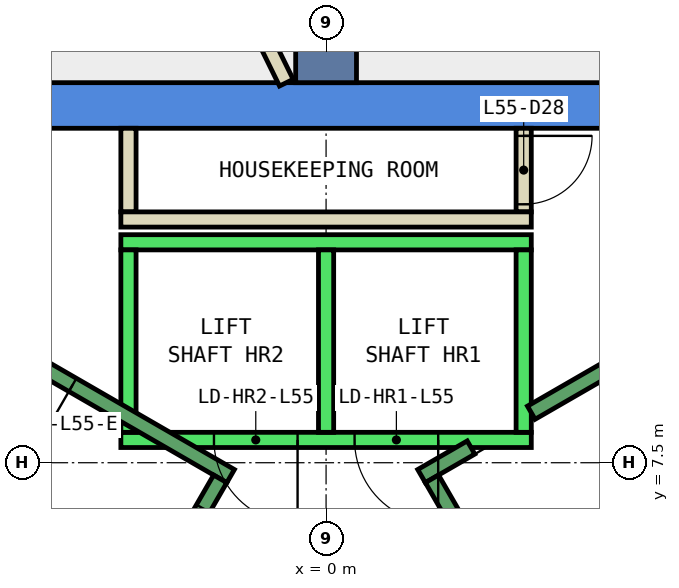
"""IFC4 building model, lengths in metres.
Left out: names, types, materials, properties, quantities, classifications, styles, units other than length and angle.
Written with IfcOpenShell. Run it as: python <this file> out.ifc"""

import sys

from ifc_helpers import new_model, si_unit, direction, frame, frame_2d, origin, place, context, subcontext, project, spatial, polyline, rectangle, outline, extrude, element, fill, save


model = new_model("IFC4")
c1 = context("Model", 3, precision=1e-05, world=origin(), true_north=direction((0.0, 1.0)))
c2 = subcontext(c1, "Body", "Model", "MODEL_VIEW")
j1 = project(units=[si_unit("LENGTHUNIT", "METRE"), si_unit("PLANEANGLEUNIT", "RADIAN")], contexts=[c1])
p1 = place(None, origin())
s1 = spatial("IfcSite", under=j1, at=p1, CompositionType="ELEMENT")
p2 = place(p1, origin())
s2 = spatial("IfcBuilding", under=s1, at=p2, CompositionType="ELEMENT")
p3 = place(p2, frame((0.0, 0.0, 245.0)))
s3 = spatial("IfcBuildingStorey", under=s2, at=p3, CompositionType="ELEMENT", Elevation=245.0)
p4 = place(p3, frame((0.0, 0.0, -0.34)))
e1 = element("IfcWall", 1, at=p4, inside=s3, PredefinedType="SHEAR", context=c2, shape_type="SweptSolid", body=[
    extrude(outline(polyline([(5.774, 12.5), (-5.774, 12.5), (-5.427, 11.9), (5.427, 11.9), (5.774, 12.5)])), origin(), (0.0, 0.0, 1.0), 3.6),
])
p5 = place(p3, frame((0.0, 12.5, -0.34), z_axis=(0.0, 0.0, 1.0), x_axis=(0.0, 1.0, 0.0)))
e2 = element("IfcWall", 2, at=p5, inside=s3, PredefinedType="SHEAR", context=c2, shape_type="SweptSolid", body=[
    extrude(rectangle(XDim=9.0, YDim=0.8, at=frame_2d((4.5, 0.0))), origin(), (0.0, 0.0, 1.0), 3.6),
])
p6 = place(p3, frame((-0.523, 12.5, 0.0), z_axis=(0.0, 0.0, 1.0), x_axis=(-0.440503659888, 0.897750814884, 0.0)))
e3 = element("IfcWall", 3, at=p6, inside=s3, PredefinedType="PARTITIONING", context=c2, shape_type="SweptSolid", body=[
    extrude(rectangle(XDim=1.793, YDim=0.2, at=frame_2d((0.897, 0.0))), origin(), (0.0, 0.0, 1.0), 3.26),
])
p7 = place(p3, frame((-2.6, 10.8, 0.0), z_axis=(0.0, 0.0, 1.0), x_axis=(0.0, 1.0, 0.0)))
e4 = element("IfcWall", 4, at=p7, inside=s3, PredefinedType="PARTITIONING", context=c2, shape_type="SweptSolid", body=[
    extrude(rectangle(XDim=1.1, YDim=0.2, at=frame_2d((0.55, 0.0))), origin(), (0.0, 0.0, 1.0), 3.26),
])
p8 = place(p3, frame((2.6, 11.9, 0.0), z_axis=(0.0, 0.0, 1.0), x_axis=(0.0, -1.0, 0.0)))
e5 = element("IfcWall", 5, at=p8, inside=s3, PredefinedType="PARTITIONING", context=c2, shape_type="SweptSolid", body=[
    extrude(rectangle(XDim=1.1, YDim=0.2, at=frame_2d((0.55, 0.0))), origin(), (0.0, 0.0, 1.0), 3.26),
])
p9 = place(p8, frame((0.1, 0.0, 0.0)))
e6 = element("IfcOpeningElement", 6, at=p9, cuts=e5, PredefinedType="OPENING", context=c2, shape_type="SweptSolid", body=[
    extrude(rectangle(XDim=0.9, YDim=2.1, at=frame_2d((0.45, 1.05))), frame((0.0, 0.11, 0.0), z_axis=(0.0, -1.0, 0.0), x_axis=(1.0, 0.0, 0.0)), (0.0, 0.0, 1.0), 0.22),
])
p10 = place(p3, frame((2.7, 10.7, 0.0), z_axis=(0.0, 0.0, 1.0), x_axis=(-1.0, 0.0, 0.0)))
e7 = element("IfcWall", 7, at=p10, inside=s3, PredefinedType="PARTITIONING", context=c2, shape_type="SweptSolid", body=[
    extrude(rectangle(XDim=5.4, YDim=0.2, at=frame_2d((2.7, 0.0))), origin(), (0.0, 0.0, 1.0), 3.26),
])
p11 = place(p3, frame((2.7, 7.8, 0.0), z_axis=(0.0, 0.0, 1.0), x_axis=(-1.0, 0.0, 0.0)))
e8 = element("IfcWall", 8, at=p11, inside=s3, PredefinedType="STANDARD", context=c2, shape_type="SweptSolid", body=[
    extrude(rectangle(XDim=5.4, YDim=0.2, at=frame_2d((2.7, 0.0))), origin(), (0.0, 0.0, 1.0), 3.26),
])
p12 = place(p11, frame((1.225, 0.0, 0.0)))
e9 = element("IfcOpeningElement", 9, at=p12, cuts=e8, PredefinedType="OPENING", context=c2, shape_type="SweptSolid", body=[
    extrude(rectangle(XDim=1.1, YDim=2.1, at=frame_2d((0.55, 1.05))), frame((0.0, 0.11, 0.0), z_axis=(0.0, -1.0, 0.0), x_axis=(1.0, 0.0, 0.0)), (0.0, 0.0, 1.0), 0.22),
])
p13 = place(p11, frame((3.075, 0.0, 0.0)))
e10 = element("IfcOpeningElement", 10, at=p13, cuts=e8, PredefinedType="OPENING", context=c2, shape_type="SweptSolid", body=[
    extrude(rectangle(XDim=1.1, YDim=2.1, at=frame_2d((0.55, 1.05))), frame((0.0, 0.11, 0.0), z_axis=(0.0, -1.0, 0.0), x_axis=(1.0, 0.0, 0.0)), (0.0, 0.0, 1.0), 0.22),
])
p14 = place(p3, frame((2.7, 10.4, 0.0), z_axis=(0.0, 0.0, 1.0), x_axis=(-1.0, 0.0, 0.0)))
e11 = element("IfcWall", 11, at=p14, inside=s3, PredefinedType="STANDARD", context=c2, shape_type="SweptSolid", body=[
    extrude(rectangle(XDim=5.4, YDim=0.2, at=frame_2d((2.7, 0.0))), origin(), (0.0, 0.0, 1.0), 3.26),
])
for number, where, z_axis, x_axis in (
    (12, (2.6, 7.9, 0.0), (0.0, 0.0, 1.0), (0.0, 1.0, 0.0)),
    (13, (0.0, 7.9, 0.0), (0.0, 0.0, 1.0), (0.0, 1.0, 0.0)),
    (14, (-2.6, 7.9, 0.0), (0.0, 0.0, 1.0), (0.0, 1.0, 0.0)),
):
    element("IfcWall", number, at=place(p3, frame(where, z_axis=z_axis, x_axis=x_axis)), inside=s3, PredefinedType="STANDARD", context=c2, shape_type="SweptSolid", body=[
        extrude(rectangle(XDim=2.4, YDim=0.2, at=frame_2d((1.2, 0.0))), origin(), (0.0, 0.0, 1.0), 3.26),
    ])
p15 = place(p3, frame((2.7, 8.158, 0.0), z_axis=(0.0, 0.0, 1.0), x_axis=(0.86611865017, 0.499838457731, 0.0)))
e15 = element("IfcWall", 15, at=p15, inside=s3, PredefinedType="STANDARD", context=c2, shape_type="SweptSolid", body=[
    extrude(rectangle(XDim=2.733, YDim=0.2, at=frame_2d((1.366, 0.0))), origin(), (0.0, 0.0, 1.0), 3.26),
])
p16 = place(p3, frame((1.256, 7.324, 0.0), z_axis=(0.0, 0.0, 1.0), x_axis=(0.865915093549, 0.500191014278, 0.0)))
e16 = element("IfcWall", 16, at=p16, inside=s3, PredefinedType="STANDARD", context=c2, shape_type="SweptSolid", body=[
    extrude(rectangle(XDim=0.752, YDim=0.2, at=frame_2d((0.376, 0.0))), origin(), (0.0, 0.0, 1.0), 3.26),
])
p17 = place(p3, frame((4.843, 1.312, 0.0), z_axis=(0.0, 0.0, 1.0), x_axis=(-0.499963383562, 0.866046543262, 0.0)))
e17 = element("IfcWall", 17, at=p17, inside=s3, PredefinedType="STANDARD", context=c2, shape_type="SweptSolid", body=[
    extrude(rectangle(XDim=6.9, YDim=0.2, at=frame_2d((3.45, 0.0))), origin(), (0.0, 0.0, 1.0), 3.26),
])
p18 = place(p17, frame((0.45, 0.0, 0.0)))
e18 = element("IfcOpeningElement", 18, at=p18, cuts=e17, PredefinedType="OPENING", context=c2, shape_type="SweptSolid", body=[
    extrude(rectangle(XDim=1.1, YDim=2.2, at=frame_2d((0.55, 1.1))), frame((0.0, 0.11, 0.0), z_axis=(0.0, -1.0, 0.0), x_axis=(1.0, 0.0, 0.0)), (0.0, 0.0, 1.0), 0.22),
])
p19 = place(p3, frame((-1.256, 7.324, 0.0), z_axis=(0.0, 0.0, 1.0), x_axis=(-0.866046073146, 0.499964197906, 0.0)))
e19 = element("IfcWall", 19, at=p19, inside=s3, PredefinedType="STANDARD", context=c2, shape_type="SweptSolid", body=[
    extrude(rectangle(XDim=4.4, YDim=0.2, at=frame_2d((2.2, 0.0))), origin(), (0.0, 0.0, 1.0), 3.26),
])
p20 = place(p19, frame((2.4, 0.0, 0.0)))
e20 = element("IfcOpeningElement", 20, at=p20, cuts=e19, PredefinedType="OPENING", context=c2, shape_type="SweptSolid", body=[
    extrude(rectangle(XDim=1.1, YDim=2.2, at=frame_2d((0.55, 1.1))), frame((0.0, 0.11, 0.0), z_axis=(0.0, -1.0, 0.0), x_axis=(1.0, 0.0, 0.0)), (0.0, 0.0, 1.0), 0.22),
])
p21 = place(p3, frame((-1.393, 7.288, 0.0), z_axis=(0.0, 0.0, 1.0), x_axis=(-0.499963383562, -0.866046543262, 0.0)))
e21 = element("IfcWall", 21, at=p21, inside=s3, PredefinedType="STANDARD", context=c2, shape_type="SweptSolid", body=[
    extrude(rectangle(XDim=6.9, YDim=0.2, at=frame_2d((3.45, 0.0))), origin(), (0.0, 0.0, 1.0), 3.26),
])
p22 = place(p21, frame((0.45, 0.0, 0.0)))
e22 = element("IfcOpeningElement", 22, at=p22, cuts=e21, PredefinedType="OPENING", context=c2, shape_type="SweptSolid", body=[
    extrude(rectangle(XDim=1.1, YDim=2.2, at=frame_2d((0.55, 1.1))), frame((0.0, 0.11, 0.0), z_axis=(0.0, -1.0, 0.0), x_axis=(1.0, 0.0, 0.0)), (0.0, 0.0, 1.0), 0.22),
])
p23 = place(p9, origin())
e23 = element("IfcDoor", 23, at=p23, inside=s3, OperationType="SINGLE_SWING_LEFT", PredefinedType="DOOR", context=c2, shape_type="SweptSolid", body=[
    extrude(rectangle(XDim=0.9, YDim=2.1, at=frame_2d((0.45, 1.05))), frame((0.0, 0.025, 0.0), z_axis=(0.0, -1.0, 0.0), x_axis=(1.0, 0.0, 0.0)), (0.0, 0.0, 1.0), 0.05),
])
fill(e6, e23)
p24 = place(p12, origin())
e24 = element("IfcDoor", 24, at=p24, inside=s3, OperationType="SLIDING_TO_LEFT", PredefinedType="DOOR", context=c2, shape_type="SweptSolid", body=[
    extrude(rectangle(XDim=1.1, YDim=2.1, at=frame_2d((0.55, 1.05))), frame((0.0, 0.025, 0.0), z_axis=(0.0, -1.0, 0.0), x_axis=(1.0, 0.0, 0.0)), (0.0, 0.0, 1.0), 0.05),
])
fill(e9, e24)
p25 = place(p13, origin())
e25 = element("IfcDoor", 25, at=p25, inside=s3, OperationType="SLIDING_TO_LEFT", PredefinedType="DOOR", context=c2, shape_type="SweptSolid", body=[
    extrude(rectangle(XDim=1.1, YDim=2.1, at=frame_2d((0.55, 1.05))), frame((0.0, 0.025, 0.0), z_axis=(0.0, -1.0, 0.0), x_axis=(1.0, 0.0, 0.0)), (0.0, 0.0, 1.0), 0.05),
])
fill(e10, e25)
p26 = place(p22, origin())
e26 = element("IfcDoor", 26, at=p26, inside=s3, OperationType="SINGLE_SWING_LEFT", PredefinedType="DOOR", context=c2, shape_type="SweptSolid", body=[
    extrude(rectangle(XDim=1.1, YDim=2.2, at=frame_2d((0.55, 1.1))), frame((0.0, 0.025, 0.0), z_axis=(0.0, -1.0, 0.0), x_axis=(1.0, 0.0, 0.0)), (0.0, 0.0, 1.0), 0.05),
])
fill(e22, e26)
p27 = place(p20, origin())
e27 = element("IfcDoor", 27, at=p27, inside=s3, OperationType="SINGLE_SWING_LEFT", PredefinedType="DOOR", context=c2, shape_type="SweptSolid", body=[
    extrude(rectangle(XDim=1.1, YDim=2.2, at=frame_2d((0.55, 1.1))), frame((0.0, 0.025, 0.0), z_axis=(0.0, -1.0, 0.0), x_axis=(1.0, 0.0, 0.0)), (0.0, 0.0, 1.0), 0.05),
])
fill(e20, e27)
save(model, sys.argv[1])
